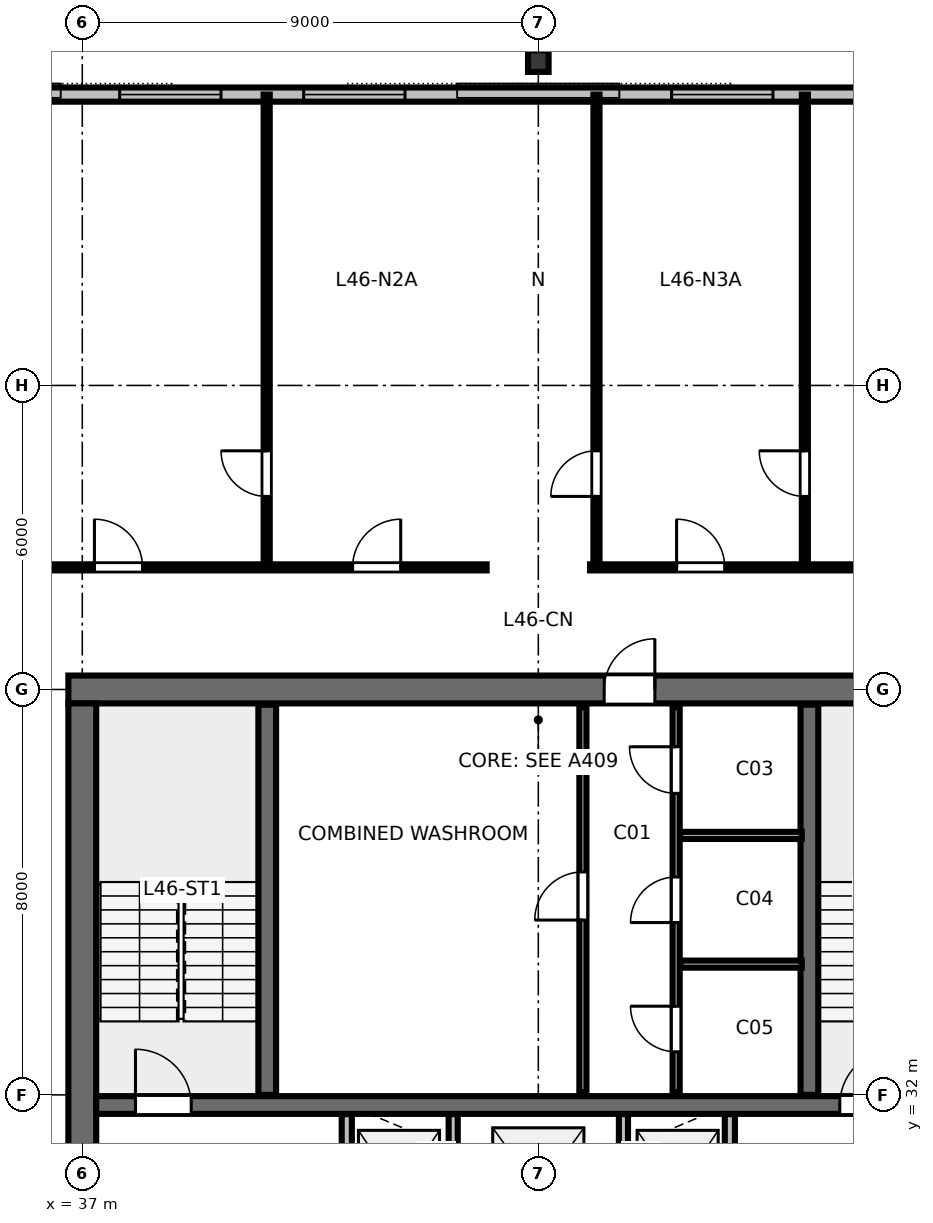
"""IFC4 building model, lengths in metres.
Left out: names, types, materials, properties, quantities, classifications, styles, units other than length and angle.
Written with IfcOpenShell. Run it as: python <this file> out.ifc"""

import sys

from ifc_helpers import new_model, si_unit, direction, frame, frame_2d, origin, origin_2d, place, context, subcontext, project, spatial, rectangle, i_section, extrude, element, fill, save


model = new_model("IFC4")
c1 = context("Model", 3, precision=1e-05, world=origin(), true_north=direction((0.0, 1.0)))
c2 = subcontext(c1, "Body", "Model", "MODEL_VIEW")
j1 = project(units=[si_unit("LENGTHUNIT", "METRE"), si_unit("PLANEANGLEUNIT", "RADIAN")], contexts=[c1])
p1 = place(None, origin())
s1 = spatial("IfcSite", under=j1, at=p1, CompositionType="ELEMENT")
p2 = place(p1, origin())
s2 = spatial("IfcBuilding", under=s1, at=p2, CompositionType="ELEMENT")
p3 = place(p2, frame((0.0, 0.0, 177.0)))
s3 = spatial("IfcBuildingStorey", under=s2, at=p3, CompositionType="ELEMENT", Elevation=177.0)
p4 = place(p3, frame((36.725, 40.0, 0.0), z_axis=(0.0, 0.0, 1.0), x_axis=(1.0, 0.0, 0.0)))
e1 = element("IfcWall", 1, at=p4, inside=s3, PredefinedType="SHEAR", context=c2, shape_type="SweptSolid", body=[
    extrude(rectangle(XDim=18.55, YDim=0.55, at=frame_2d((9.275, 0.0))), origin(), (0.0, 0.0, 1.0), 3.36),
])
p5 = place(p4, frame((10.575, 0.0, 0.0)))
e2 = element("IfcOpeningElement", 2, at=p5, cuts=e1, PredefinedType="OPENING", context=c2, shape_type="SweptSolid", body=[
    extrude(rectangle(XDim=1.0, YDim=2.15, at=frame_2d((0.5, 1.075))), frame((0.0, 0.285, 0.0), z_axis=(0.0, -1.0, 0.0), x_axis=(1.0, 0.0, 0.0)), (0.0, 0.0, 1.0), 0.57),
])
p6 = place(p3, frame((37.0, 24.275, 0.0), z_axis=(0.0, 0.0, 1.0), x_axis=(0.0, 1.0, 0.0)))
e3 = element("IfcWall", 3, at=p6, inside=s3, PredefinedType="SHEAR", context=c2, shape_type="SweptSolid", body=[
    extrude(rectangle(XDim=15.45, YDim=0.55, at=frame_2d((7.725, 0.0))), origin(), (0.0, 0.0, 1.0), 3.36),
])
p7 = place(p6, frame((5.25, 0.0, 0.0)))
e4 = element("IfcOpeningElement", 4, at=p7, cuts=e3, PredefinedType="OPENING", context=c2, shape_type="SweptSolid", body=[
    extrude(rectangle(XDim=1.15, YDim=2.15, at=frame_2d((0.575, 1.075))), frame((0.0, 0.285, 0.0), z_axis=(0.0, -1.0, 0.0), x_axis=(1.0, 0.0, 0.0)), (0.0, 0.0, 1.0), 0.57),
])
p8 = place(p3, frame((37.275, 31.8, 0.0), z_axis=(0.0, 0.0, 1.0), x_axis=(1.0, 0.0, 0.0)))
e5 = element("IfcWall", 5, at=p8, inside=s3, PredefinedType="SHEAR", context=c2, shape_type="SweptSolid", body=[
    extrude(rectangle(XDim=17.45, YDim=0.35, at=frame_2d((8.725, 0.0))), origin(), (0.0, 0.0, 1.0), 3.36),
])
p9 = place(p8, frame((0.775, 0.0, 0.0)))
e6 = element("IfcOpeningElement", 6, at=p9, cuts=e5, PredefinedType="OPENING", context=c2, shape_type="SweptSolid", body=[
    extrude(rectangle(XDim=1.1, YDim=2.15, at=frame_2d((0.55, 1.075))), frame((0.0, 0.185, 0.0), z_axis=(0.0, -1.0, 0.0), x_axis=(1.0, 0.0, 0.0)), (0.0, 0.0, 1.0), 0.37),
])
p10 = place(p8, frame((14.675, 0.0, 0.0)))
e7 = element("IfcOpeningElement", 7, at=p10, cuts=e5, PredefinedType="OPENING", context=c2, shape_type="SweptSolid", body=[
    extrude(rectangle(XDim=1.1, YDim=2.15, at=frame_2d((0.55, 1.075))), frame((0.0, 0.185, 0.0), z_axis=(0.0, -1.0, 0.0), x_axis=(1.0, 0.0, 0.0)), (0.0, 0.0, 1.0), 0.37),
])
p11 = place(p3, frame((46.0, 52.4, 0.0), z_axis=(0.0, 0.0, 1.0), x_axis=(1.0, 0.0, 0.0)))
e8 = element("IfcColumn", 8, at=p11, inside=s3, PredefinedType="COLUMN", context=c2, shape_type="SweptSolid", body=[
    extrude(i_section(OverallWidth=0.406, OverallDepth=0.425, WebThickness=0.033, FlangeThickness=0.052, FilletRadius=0.025, at=origin_2d()), origin(), (0.0, 0.0, 1.0), 3.358),
])
p12 = place(p3, frame((63.44, 51.74, 0.0), z_axis=(0.0, 0.0, 1.0), x_axis=(-1.0, 0.0, 0.0)))
e9 = element("IfcWall", 9, at=p12, inside=s3, PredefinedType="STANDARD", context=c2, shape_type="SweptSolid", body=[
    extrude(rectangle(XDim=34.88, YDim=0.28, at=frame_2d((17.44, 0.0))), origin(), (0.0, 0.0, 1.0), 3.36),
])
p13 = place(p12, frame((1.916, 0.0, 0.8)))
e10 = element("IfcOpeningElement", 10, at=p13, cuts=e9, PredefinedType="OPENING", context=c2, shape_type="SweptSolid", body=[
    extrude(rectangle(XDim=2.0, YDim=1.95, at=frame_2d((1.0, 0.975))), frame((0.0, 0.15, 0.0), z_axis=(0.0, -1.0, 0.0), x_axis=(1.0, 0.0, 0.0)), (0.0, 0.0, 1.0), 0.3),
])
p14 = place(p12, frame((5.547, 0.0, 0.8)))
e11 = element("IfcOpeningElement", 11, at=p14, cuts=e9, PredefinedType="OPENING", context=c2, shape_type="SweptSolid", body=[
    extrude(rectangle(XDim=2.0, YDim=1.95, at=frame_2d((1.0, 0.975))), frame((0.0, 0.15, 0.0), z_axis=(0.0, -1.0, 0.0), x_axis=(1.0, 0.0, 0.0)), (0.0, 0.0, 1.0), 0.3),
])
p15 = place(p12, frame((9.178, 0.0, 0.8)))
e12 = element("IfcOpeningElement", 12, at=p15, cuts=e9, PredefinedType="OPENING", context=c2, shape_type="SweptSolid", body=[
    extrude(rectangle(XDim=2.0, YDim=1.95, at=frame_2d((1.0, 0.975))), frame((0.0, 0.15, 0.0), z_axis=(0.0, -1.0, 0.0), x_axis=(1.0, 0.0, 0.0)), (0.0, 0.0, 1.0), 0.3),
])
p16 = place(p12, frame((12.809, 0.0, 0.8)))
e13 = element("IfcOpeningElement", 13, at=p16, cuts=e9, PredefinedType="OPENING", context=c2, shape_type="SweptSolid", body=[
    extrude(rectangle(XDim=2.0, YDim=1.95, at=frame_2d((1.0, 0.975))), frame((0.0, 0.15, 0.0), z_axis=(0.0, -1.0, 0.0), x_axis=(1.0, 0.0, 0.0)), (0.0, 0.0, 1.0), 0.3),
])
p17 = place(p12, frame((20.071, 0.0, 0.8)))
e14 = element("IfcOpeningElement", 14, at=p17, cuts=e9, PredefinedType="OPENING", context=c2, shape_type="SweptSolid", body=[
    extrude(rectangle(XDim=2.0, YDim=1.95, at=frame_2d((1.0, 0.975))), frame((0.0, 0.15, 0.0), z_axis=(0.0, -1.0, 0.0), x_axis=(1.0, 0.0, 0.0)), (0.0, 0.0, 1.0), 0.3),
])
p18 = place(p12, frame((23.702, 0.0, 0.8)))
e15 = element("IfcOpeningElement", 15, at=p18, cuts=e9, PredefinedType="OPENING", context=c2, shape_type="SweptSolid", body=[
    extrude(rectangle(XDim=2.0, YDim=1.95, at=frame_2d((1.0, 0.975))), frame((0.0, 0.15, 0.0), z_axis=(0.0, -1.0, 0.0), x_axis=(1.0, 0.0, 0.0)), (0.0, 0.0, 1.0), 0.3),
])
p19 = place(p12, frame((27.333, 0.0, 0.8)))
e16 = element("IfcOpeningElement", 16, at=p19, cuts=e9, PredefinedType="OPENING", context=c2, shape_type="SweptSolid", body=[
    extrude(rectangle(XDim=2.0, YDim=1.95, at=frame_2d((1.0, 0.975))), frame((0.0, 0.15, 0.0), z_axis=(0.0, -1.0, 0.0), x_axis=(1.0, 0.0, 0.0)), (0.0, 0.0, 1.0), 0.3),
])
p20 = place(p12, frame((30.964, 0.0, 0.8)))
e17 = element("IfcOpeningElement", 17, at=p20, cuts=e9, PredefinedType="OPENING", context=c2, shape_type="SweptSolid", body=[
    extrude(rectangle(XDim=2.0, YDim=1.95, at=frame_2d((1.0, 0.975))), frame((0.0, 0.15, 0.0), z_axis=(0.0, -1.0, 0.0), x_axis=(1.0, 0.0, 0.0)), (0.0, 0.0, 1.0), 0.3),
])
for number, where, z_axis, x_axis in (
    (18, (40.65, 32.0, 0.0), (0.0, 0.0, 1.0), (0.0, 1.0, 0.0)),
    (19, (51.35, 32.0, 0.0), (0.0, 0.0, 1.0), (0.0, 1.0, 0.0)),
):
    element("IfcWall", number, at=place(p3, frame(where, z_axis=z_axis, x_axis=x_axis)), inside=s3, PredefinedType="SHEAR", context=c2, shape_type="SweptSolid", body=[
        extrude(rectangle(XDim=7.7, YDim=0.35, at=frame_2d((3.85, 0.0))), origin(), (0.0, 0.0, 1.0), 3.6),
    ])
p21 = place(p3, frame((46.88, 32.05, 0.0), z_axis=(0.0, 0.0, 1.0), x_axis=(0.0, 1.0, 0.0)))
e20 = element("IfcWall", 20, at=p21, inside=s3, PredefinedType="PARTITIONING", context=c2, shape_type="SweptSolid", body=[
    extrude(rectangle(XDim=7.6, YDim=0.14, at=frame_2d((3.8, 0.0))), origin(), (0.0, 0.0, 1.0), 3.36),
])
p22 = place(p21, frame((3.4, 0.0, 0.0)))
e21 = element("IfcOpeningElement", 21, at=p22, cuts=e20, PredefinedType="OPENING", context=c2, shape_type="SweptSolid", body=[
    extrude(rectangle(XDim=0.95, YDim=2.15, at=frame_2d((0.475, 1.075))), frame((0.0, 0.08, 0.0), z_axis=(0.0, -1.0, 0.0), x_axis=(1.0, 0.0, 0.0)), (0.0, 0.0, 1.0), 0.16),
])
p23 = place(p3, frame((48.72, 32.05, 0.0), z_axis=(0.0, 0.0, 1.0), x_axis=(0.0, 1.0, 0.0)))
e22 = element("IfcWall", 22, at=p23, inside=s3, PredefinedType="PARTITIONING", context=c2, shape_type="SweptSolid", body=[
    extrude(rectangle(XDim=7.6, YDim=0.14, at=frame_2d((3.8, 0.0))), origin(), (0.0, 0.0, 1.0), 3.36),
])
p24 = place(p23, frame((0.8, 0.0, 0.0)))
e23 = element("IfcOpeningElement", 23, at=p24, cuts=e22, PredefinedType="OPENING", context=c2, shape_type="SweptSolid", body=[
    extrude(rectangle(XDim=0.9, YDim=2.15, at=frame_2d((0.45, 1.075))), frame((0.0, 0.08, 0.0), z_axis=(0.0, -1.0, 0.0), x_axis=(1.0, 0.0, 0.0)), (0.0, 0.0, 1.0), 0.16),
])
p25 = place(p23, frame((3.35, 0.0, 0.0)))
e24 = element("IfcOpeningElement", 24, at=p25, cuts=e22, PredefinedType="OPENING", context=c2, shape_type="SweptSolid", body=[
    extrude(rectangle(XDim=0.9, YDim=2.15, at=frame_2d((0.45, 1.075))), frame((0.0, 0.08, 0.0), z_axis=(0.0, -1.0, 0.0), x_axis=(1.0, 0.0, 0.0)), (0.0, 0.0, 1.0), 0.16),
])
p26 = place(p23, frame((5.9, 0.0, 0.0)))
e25 = element("IfcOpeningElement", 25, at=p26, cuts=e22, PredefinedType="OPENING", context=c2, shape_type="SweptSolid", body=[
    extrude(rectangle(XDim=0.92, YDim=2.15, at=frame_2d((0.46, 1.075))), frame((0.0, 0.08, 0.0), z_axis=(0.0, -1.0, 0.0), x_axis=(1.0, 0.0, 0.0)), (0.0, 0.0, 1.0), 0.16),
])
for number, where, z_axis, x_axis in (
    (26, (48.8, 34.58, 0.0), (0.0, 0.0, 1.0), (1.0, 0.0, 0.0)),
    (27, (48.8, 37.12, 0.0), (0.0, 0.0, 1.0), (1.0, 0.0, 0.0)),
):
    element("IfcWall", number, at=place(p3, frame(where, z_axis=z_axis, x_axis=x_axis)), inside=s3, PredefinedType="PARTITIONING", context=c2, shape_type="SweptSolid", body=[
        extrude(rectangle(XDim=2.4, YDim=0.14, at=frame_2d((1.2, 0.0))), origin(), (0.0, 0.0, 1.0), 3.36),
    ])
p27 = place(p3, frame((42.22, 28.58, 0.0), z_axis=(0.0, 0.0, 1.0), x_axis=(0.0, 1.0, 0.0)))
e28 = element("IfcWall", 28, at=p27, inside=s3, PredefinedType="PARTITIONING", context=c2, shape_type="SweptSolid", body=[
    extrude(rectangle(XDim=3.04, YDim=0.2, at=frame_2d((1.52, 0.0))), origin(), (0.0, 0.0, 1.0), 3.36),
])
p28 = place(p27, frame((0.95, 0.0, 0.0)))
e29 = element("IfcOpeningElement", 29, at=p28, cuts=e28, PredefinedType="OPENING", context=c2, shape_type="SweptSolid", body=[
    extrude(rectangle(XDim=1.05, YDim=2.15, at=frame_2d((0.525, 1.075))), frame((0.0, 0.11, 0.0), z_axis=(0.0, -1.0, 0.0), x_axis=(1.0, 0.0, 0.0)), (0.0, 0.0, 1.0), 0.22),
])
p29 = place(p3, frame((49.78, 28.58, 0.0), z_axis=(0.0, 0.0, 1.0), x_axis=(0.0, 1.0, 0.0)))
e30 = element("IfcWall", 30, at=p29, inside=s3, PredefinedType="PARTITIONING", context=c2, shape_type="SweptSolid", body=[
    extrude(rectangle(XDim=3.04, YDim=0.2, at=frame_2d((1.52, 0.0))), origin(), (0.0, 0.0, 1.0), 3.36),
])
p30 = place(p29, frame((0.95, 0.0, 0.0)))
e31 = element("IfcOpeningElement", 31, at=p30, cuts=e30, PredefinedType="OPENING", context=c2, shape_type="SweptSolid", body=[
    extrude(rectangle(XDim=1.05, YDim=2.15, at=frame_2d((0.525, 1.075))), frame((0.0, 0.11, 0.0), z_axis=(0.0, -1.0, 0.0), x_axis=(1.0, 0.0, 0.0)), (0.0, 0.0, 1.0), 0.22),
])
for number, where, z_axis, x_axis in (
    (32, (44.32, 28.58, 0.0), (0.0, 0.0, 1.0), (0.0, 1.0, 0.0)),
    (33, (47.68, 28.58, 0.0), (0.0, 0.0, 1.0), (0.0, 1.0, 0.0)),
):
    element("IfcWall", number, at=place(p3, frame(where, z_axis=z_axis, x_axis=x_axis)), inside=s3, PredefinedType="PARTITIONING", context=c2, shape_type="SweptSolid", body=[
        extrude(rectangle(XDim=3.04, YDim=0.18, at=frame_2d((1.52, 0.0))), origin(), (0.0, 0.0, 1.0), 3.36),
    ])
p31 = place(p3, frame((40.639, 42.41, 0.0), z_axis=(0.0, 0.0, 1.0), x_axis=(0.0, 1.0, 0.0)))
e34 = element("IfcWall", 34, at=p31, inside=s3, PredefinedType="PARTITIONING", context=c2, shape_type="SweptSolid", body=[
    extrude(rectangle(XDim=9.33, YDim=0.12, at=frame_2d((4.665, 0.0))), origin(), (0.0, 0.0, 1.0), 2.64),
])
p32 = place(p31, frame((1.4, 0.0, 0.0)))
e35 = element("IfcOpeningElement", 35, at=p32, cuts=e34, PredefinedType="OPENING", context=c2, shape_type="SweptSolid", body=[
    extrude(rectangle(XDim=0.9, YDim=2.15, at=frame_2d((0.45, 1.075))), frame((0.0, 0.07, 0.0), z_axis=(0.0, -1.0, 0.0), x_axis=(1.0, 0.0, 0.0)), (0.0, 0.0, 1.0), 0.14),
])
p33 = place(p3, frame((47.148, 42.41, 0.0), z_axis=(0.0, 0.0, 1.0), x_axis=(0.0, 1.0, 0.0)))
e36 = element("IfcWall", 36, at=p33, inside=s3, PredefinedType="PARTITIONING", context=c2, shape_type="SweptSolid", body=[
    extrude(rectangle(XDim=9.33, YDim=0.12, at=frame_2d((4.665, 0.0))), origin(), (0.0, 0.0, 1.0), 2.64),
])
p34 = place(p33, frame((1.4, 0.0, 0.0)))
e37 = element("IfcOpeningElement", 37, at=p34, cuts=e36, PredefinedType="OPENING", context=c2, shape_type="SweptSolid", body=[
    extrude(rectangle(XDim=0.9, YDim=2.15, at=frame_2d((0.45, 1.075))), frame((0.0, 0.07, 0.0), z_axis=(0.0, -1.0, 0.0), x_axis=(1.0, 0.0, 0.0)), (0.0, 0.0, 1.0), 0.14),
])
p35 = place(p3, frame((51.261, 42.41, 0.0), z_axis=(0.0, 0.0, 1.0), x_axis=(0.0, 1.0, 0.0)))
e38 = element("IfcWall", 38, at=p35, inside=s3, PredefinedType="PARTITIONING", context=c2, shape_type="SweptSolid", body=[
    extrude(rectangle(XDim=9.33, YDim=0.12, at=frame_2d((4.665, 0.0))), origin(), (0.0, 0.0, 1.0), 2.64),
])
p36 = place(p35, frame((1.4, 0.0, 0.0)))
e39 = element("IfcOpeningElement", 39, at=p36, cuts=e38, PredefinedType="OPENING", context=c2, shape_type="SweptSolid", body=[
    extrude(rectangle(XDim=0.9, YDim=2.15, at=frame_2d((0.45, 1.075))), frame((0.0, 0.07, 0.0), z_axis=(0.0, -1.0, 0.0), x_axis=(1.0, 0.0, 0.0)), (0.0, 0.0, 1.0), 0.14),
])
p37 = place(p3, frame((34.65, 42.41, 0.0), z_axis=(0.0, 0.0, 1.0), x_axis=(1.0, 0.0, 0.0)))
e40 = element("IfcWall", 40, at=p37, inside=s3, PredefinedType="PARTITIONING", context=c2, shape_type="SweptSolid", body=[
    extrude(rectangle(XDim=10.33, YDim=0.12, at=frame_2d((5.165, 0.0))), origin(), (0.0, 0.0, 1.0), 2.64),
])
p38 = place(p37, frame((2.59, 0.0, 0.0)))
e41 = element("IfcOpeningElement", 41, at=p38, cuts=e40, PredefinedType="OPENING", context=c2, shape_type="SweptSolid", body=[
    extrude(rectangle(XDim=0.95, YDim=2.15, at=frame_2d((0.475, 1.075))), frame((0.0, 0.07, 0.0), z_axis=(0.0, -1.0, 0.0), x_axis=(1.0, 0.0, 0.0)), (0.0, 0.0, 1.0), 0.14),
])
p39 = place(p37, frame((7.685, 0.0, 0.0)))
e42 = element("IfcOpeningElement", 42, at=p39, cuts=e40, PredefinedType="OPENING", context=c2, shape_type="SweptSolid", body=[
    extrude(rectangle(XDim=0.95, YDim=2.15, at=frame_2d((0.475, 1.075))), frame((0.0, 0.07, 0.0), z_axis=(0.0, -1.0, 0.0), x_axis=(1.0, 0.0, 0.0)), (0.0, 0.0, 1.0), 0.14),
])
p40 = place(p3, frame((47.02, 42.41, 0.0), z_axis=(0.0, 0.0, 1.0), x_axis=(1.0, 0.0, 0.0)))
e43 = element("IfcWall", 43, at=p40, inside=s3, PredefinedType="PARTITIONING", context=c2, shape_type="SweptSolid", body=[
    extrude(rectangle(XDim=10.33, YDim=0.12, at=frame_2d((5.165, 0.0))), origin(), (0.0, 0.0, 1.0), 2.64),
])
p41 = place(p40, frame((1.709, 0.0, 0.0)))
e44 = element("IfcOpeningElement", 44, at=p41, cuts=e43, PredefinedType="OPENING", context=c2, shape_type="SweptSolid", body=[
    extrude(rectangle(XDim=0.95, YDim=2.15, at=frame_2d((0.475, 1.075))), frame((0.0, 0.07, 0.0), z_axis=(0.0, -1.0, 0.0), x_axis=(1.0, 0.0, 0.0)), (0.0, 0.0, 1.0), 0.14),
])
p42 = place(p40, frame((6.74, 0.0, 0.0)))
e45 = element("IfcOpeningElement", 45, at=p42, cuts=e43, PredefinedType="OPENING", context=c2, shape_type="SweptSolid", body=[
    extrude(rectangle(XDim=0.95, YDim=2.15, at=frame_2d((0.475, 1.075))), frame((0.0, 0.07, 0.0), z_axis=(0.0, -1.0, 0.0), x_axis=(1.0, 0.0, 0.0)), (0.0, 0.0, 1.0), 0.14),
])
p43 = place(p16, origin())
e46 = element("IfcWindow", 46, at=p43, inside=s3, PartitioningType="SINGLE_PANEL", PredefinedType="WINDOW", context=c2, shape_type="SweptSolid", body=[
    extrude(rectangle(XDim=2.0, YDim=1.95, at=frame_2d((1.0, 0.975))), frame((0.0, 0.03, 0.0), z_axis=(0.0, -1.0, 0.0), x_axis=(1.0, 0.0, 0.0)), (0.0, 0.0, 1.0), 0.06),
])
fill(e13, e46)
p44 = place(p17, origin())
e47 = element("IfcWindow", 47, at=p44, inside=s3, PartitioningType="SINGLE_PANEL", PredefinedType="WINDOW", context=c2, shape_type="SweptSolid", body=[
    extrude(rectangle(XDim=2.0, YDim=1.95, at=frame_2d((1.0, 0.975))), frame((0.0, 0.03, 0.0), z_axis=(0.0, -1.0, 0.0), x_axis=(1.0, 0.0, 0.0)), (0.0, 0.0, 1.0), 0.06),
])
fill(e14, e47)
p45 = place(p18, origin())
e48 = element("IfcWindow", 48, at=p45, inside=s3, PartitioningType="SINGLE_PANEL", PredefinedType="WINDOW", context=c2, shape_type="SweptSolid", body=[
    extrude(rectangle(XDim=2.0, YDim=1.95, at=frame_2d((1.0, 0.975))), frame((0.0, 0.03, 0.0), z_axis=(0.0, -1.0, 0.0), x_axis=(1.0, 0.0, 0.0)), (0.0, 0.0, 1.0), 0.06),
])
fill(e15, e48)
p46 = place(p9, origin())
e49 = element("IfcDoor", 49, at=p46, inside=s3, OperationType="SINGLE_SWING_LEFT", PredefinedType="DOOR", context=c2, shape_type="SweptSolid", body=[
    extrude(rectangle(XDim=1.1, YDim=2.15, at=frame_2d((0.55, 1.075))), frame((0.0, 0.025, 0.0), z_axis=(0.0, -1.0, 0.0), x_axis=(1.0, 0.0, 0.0)), (0.0, 0.0, 1.0), 0.05),
])
fill(e6, e49)
p47 = place(p10, origin())
e50 = element("IfcDoor", 50, at=p47, inside=s3, OperationType="SINGLE_SWING_RIGHT", PredefinedType="DOOR", context=c2, shape_type="SweptSolid", body=[
    extrude(rectangle(XDim=1.1, YDim=2.15, at=frame_2d((0.55, 1.075))), frame((0.0, 0.025, 0.0), z_axis=(0.0, -1.0, 0.0), x_axis=(1.0, 0.0, 0.0)), (0.0, 0.0, 1.0), 0.05),
])
fill(e7, e50)
p48 = place(p5, origin())
e51 = element("IfcDoor", 51, at=p48, inside=s3, OperationType="SINGLE_SWING_RIGHT", PredefinedType="DOOR", context=c2, shape_type="SweptSolid", body=[
    extrude(rectangle(XDim=1.0, YDim=2.15, at=frame_2d((0.5, 1.075))), frame((0.0, 0.025, 0.0), z_axis=(0.0, -1.0, 0.0), x_axis=(1.0, 0.0, 0.0)), (0.0, 0.0, 1.0), 0.05),
])
fill(e2, e51)
p49 = place(p22, origin())
e52 = element("IfcDoor", 52, at=p49, inside=s3, OperationType="SINGLE_SWING_LEFT", PredefinedType="DOOR", context=c2, shape_type="SweptSolid", body=[
    extrude(rectangle(XDim=0.95, YDim=2.15, at=frame_2d((0.475, 1.075))), frame((0.0, 0.025, 0.0), z_axis=(0.0, -1.0, 0.0), x_axis=(1.0, 0.0, 0.0)), (0.0, 0.0, 1.0), 0.05),
])
fill(e21, e52)
p50 = place(p24, origin())
e53 = element("IfcDoor", 53, at=p50, inside=s3, OperationType="SINGLE_SWING_RIGHT", PredefinedType="DOOR", context=c2, shape_type="SweptSolid", body=[
    extrude(rectangle(XDim=0.9, YDim=2.15, at=frame_2d((0.45, 1.075))), frame((0.0, 0.025, 0.0), z_axis=(0.0, -1.0, 0.0), x_axis=(1.0, 0.0, 0.0)), (0.0, 0.0, 1.0), 0.05),
])
fill(e23, e53)
p51 = place(p25, origin())
e54 = element("IfcDoor", 54, at=p51, inside=s3, OperationType="SINGLE_SWING_LEFT", PredefinedType="DOOR", context=c2, shape_type="SweptSolid", body=[
    extrude(rectangle(XDim=0.9, YDim=2.15, at=frame_2d((0.45, 1.075))), frame((0.0, 0.025, 0.0), z_axis=(0.0, -1.0, 0.0), x_axis=(1.0, 0.0, 0.0)), (0.0, 0.0, 1.0), 0.05),
])
fill(e24, e54)
p52 = place(p26, origin())
e55 = element("IfcDoor", 55, at=p52, inside=s3, OperationType="SINGLE_SWING_RIGHT", PredefinedType="DOOR", context=c2, shape_type="SweptSolid", body=[
    extrude(rectangle(XDim=0.92, YDim=2.15, at=frame_2d((0.46, 1.075))), frame((0.0, 0.025, 0.0), z_axis=(0.0, -1.0, 0.0), x_axis=(1.0, 0.0, 0.0)), (0.0, 0.0, 1.0), 0.05),
])
fill(e25, e55)
p53 = place(p32, origin())
e56 = element("IfcDoor", 56, at=p53, inside=s3, OperationType="SINGLE_SWING_RIGHT", PredefinedType="DOOR", context=c2, shape_type="SweptSolid", body=[
    extrude(rectangle(XDim=0.9, YDim=2.15, at=frame_2d((0.45, 1.075))), frame((0.0, 0.025, 0.0), z_axis=(0.0, -1.0, 0.0), x_axis=(1.0, 0.0, 0.0)), (0.0, 0.0, 1.0), 0.05),
])
fill(e35, e56)
p54 = place(p34, origin())
e57 = element("IfcDoor", 57, at=p54, inside=s3, OperationType="SINGLE_SWING_LEFT", PredefinedType="DOOR", context=c2, shape_type="SweptSolid", body=[
    extrude(rectangle(XDim=0.9, YDim=2.15, at=frame_2d((0.45, 1.075))), frame((0.0, 0.025, 0.0), z_axis=(0.0, -1.0, 0.0), x_axis=(1.0, 0.0, 0.0)), (0.0, 0.0, 1.0), 0.05),
])
fill(e37, e57)
p55 = place(p36, origin())
e58 = element("IfcDoor", 58, at=p55, inside=s3, OperationType="SINGLE_SWING_RIGHT", PredefinedType="DOOR", context=c2, shape_type="SweptSolid", body=[
    extrude(rectangle(XDim=0.9, YDim=2.15, at=frame_2d((0.45, 1.075))), frame((0.0, 0.025, 0.0), z_axis=(0.0, -1.0, 0.0), x_axis=(1.0, 0.0, 0.0)), (0.0, 0.0, 1.0), 0.05),
])
fill(e39, e58)
p56 = place(p38, origin())
e59 = element("IfcDoor", 59, at=p56, inside=s3, OperationType="SINGLE_SWING_LEFT", PredefinedType="DOOR", context=c2, shape_type="SweptSolid", body=[
    extrude(rectangle(XDim=0.95, YDim=2.15, at=frame_2d((0.475, 1.075))), frame((0.0, 0.025, 0.0), z_axis=(0.0, -1.0, 0.0), x_axis=(1.0, 0.0, 0.0)), (0.0, 0.0, 1.0), 0.05),
])
fill(e41, e59)
p57 = place(p39, origin())
e60 = element("IfcDoor", 60, at=p57, inside=s3, OperationType="SINGLE_SWING_RIGHT", PredefinedType="DOOR", context=c2, shape_type="SweptSolid", body=[
    extrude(rectangle(XDim=0.95, YDim=2.15, at=frame_2d((0.475, 1.075))), frame((0.0, 0.025, 0.0), z_axis=(0.0, -1.0, 0.0), x_axis=(1.0, 0.0, 0.0)), (0.0, 0.0, 1.0), 0.05),
])
fill(e42, e60)
p58 = place(p41, origin())
e61 = element("IfcDoor", 61, at=p58, inside=s3, OperationType="SINGLE_SWING_LEFT", PredefinedType="DOOR", context=c2, shape_type="SweptSolid", body=[
    extrude(rectangle(XDim=0.95, YDim=2.15, at=frame_2d((0.475, 1.075))), frame((0.0, 0.025, 0.0), z_axis=(0.0, -1.0, 0.0), x_axis=(1.0, 0.0, 0.0)), (0.0, 0.0, 1.0), 0.05),
])
fill(e44, e61)
save(model, sys.argv[1])
